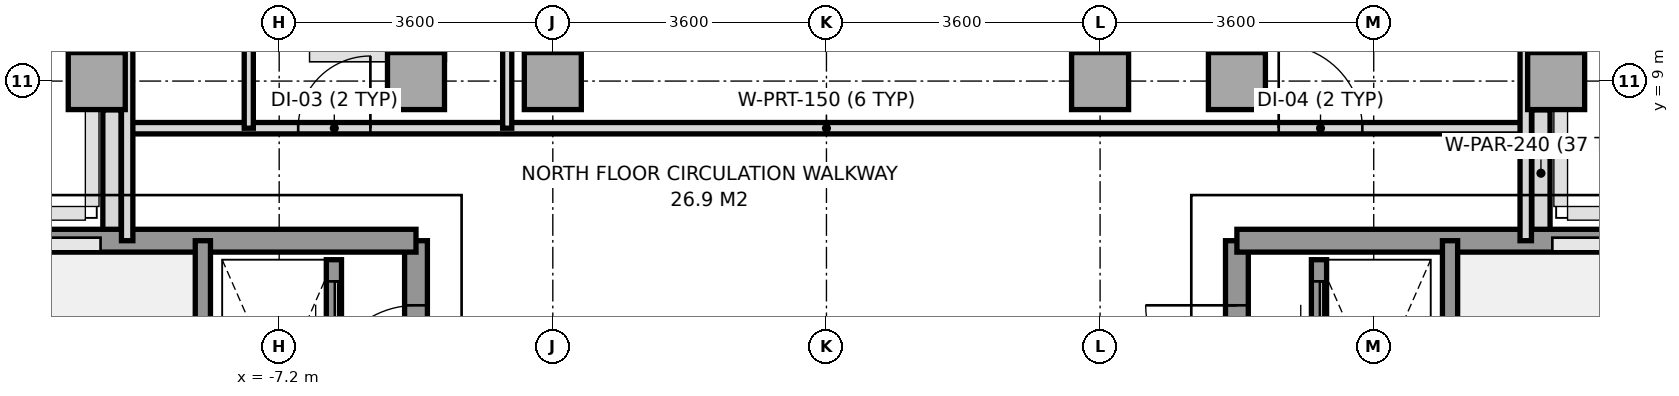
"""IFC4 building model, lengths in metres.
Left out: names, types, materials, properties, quantities, classifications, styles, units other than length and angle.
Written with IfcOpenShell. Run it as: python <this file> out.ifc"""

import sys

from ifc_helpers import new_model, si_unit, direction, frame, frame_2d, origin, origin_2d, place, context, subcontext, project, spatial, rectangle, extrude, source, transform, mapped, element, fill, save


model = new_model("IFC4")
c1 = context("Model", 3, precision=1e-05, world=origin(), true_north=direction((0.0, 1.0)))
c2 = subcontext(c1, "Body", "Model", "MODEL_VIEW")
j1 = project(units=[si_unit("LENGTHUNIT", "METRE"), si_unit("PLANEANGLEUNIT", "RADIAN")], contexts=[c1])
p1 = place(None, origin())
s1 = spatial("IfcSite", under=j1, at=p1, CompositionType="ELEMENT")
p2 = place(p1, origin())
s2 = spatial("IfcBuilding", under=s1, at=p2, CompositionType="ELEMENT")
p3 = place(p2, frame((0.0, 0.0, 219.4)))
s3 = spatial("IfcBuildingStorey", under=s2, at=p3, CompositionType="ELEMENT", Elevation=219.4)
m1 = source(origin(), c2, "Body", "SweptSolid", [
    extrude(rectangle(XDim=0.75, YDim=0.75, at=origin_2d()), origin(), (0.0, 0.0, 1.0), 4.01),
])
for number, where, z_axis, x_axis in (
    (1, (-9.6, 9.0, 0.0), (0.0, 0.0, 1.0), (1.0, 0.0, 0.0)),
    (2, (-5.4, 9.0, 0.0), (0.0, 0.0, 1.0), (1.0, 0.0, 0.0)),
    (3, (-3.6, 9.0, 0.0), (0.0, 0.0, 1.0), (1.0, 0.0, 0.0)),
    (4, (3.6, 9.0, 0.0), (0.0, 0.0, 1.0), (1.0, 0.0, 0.0)),
    (5, (5.4, 9.0, 0.0), (0.0, 0.0, 1.0), (1.0, 0.0, 0.0)),
    (6, (9.6, 9.0, 0.0), (0.0, 0.0, 1.0), (1.0, 0.0, 0.0)),
):
    element("IfcColumn", number, at=place(p3, frame(where, z_axis=z_axis, x_axis=x_axis)), inside=s3, PredefinedType="COLUMN", context=c2, shape_type="MappedRepresentation", body=[
        mapped(m1, transform((0.0, 0.0, 0.0), x_axis=(1.0, 0.0, 0.0), y_axis=(0.0, 1.0, 0.0), z_axis=(0.0, 0.0, 1.0), scale=1.0)),
    ])
p4 = place(p3, frame((-9.4, 6.953, 0.0), z_axis=(0.0, 0.0, 1.0), x_axis=(0.0, 1.0, 0.0)))
e7 = element("IfcWall", 7, at=p4, inside=s3, PredefinedType="PARAPET", context=c2, shape_type="SweptSolid", body=[
    extrude(rectangle(XDim=1.669, YDim=0.24, at=frame_2d((0.834, 0.0))), origin(), (0.0, 0.0, 1.0), 1.15),
])
p5 = place(p3, frame((-9.4, 9.378, 0.0), z_axis=(0.0, 0.0, 1.0), x_axis=(0.0, 1.0, 0.0)))
e8 = element("IfcWall", 8, at=p5, inside=s3, PredefinedType="PARAPET", context=c2, shape_type="SweptSolid", body=[
    extrude(rectangle(XDim=0.825, YDim=0.24, at=frame_2d((0.413, 0.0))), origin(), (0.0, 0.0, 1.0), 1.15),
])
p6 = place(p3, frame((9.4, 9.958, 0.0), z_axis=(0.0, 0.0, 1.0), x_axis=(0.0, -1.0, 0.0)))
e9 = element("IfcWall", 9, at=p6, inside=s3, PredefinedType="PARAPET", context=c2, shape_type="SweptSolid", body=[
    extrude(rectangle(XDim=0.58, YDim=0.24, at=frame_2d((0.29, 0.0))), origin(), (0.0, 0.0, 1.0), 1.15),
])
p7 = place(p3, frame((9.4, 8.622, 0.0), z_axis=(0.0, 0.0, 1.0), x_axis=(0.0, -1.0, 0.0)))
e10 = element("IfcWall", 10, at=p7, inside=s3, PredefinedType="PARAPET", context=c2, shape_type="SweptSolid", body=[
    extrude(rectangle(XDim=1.669, YDim=0.24, at=frame_2d((0.834, 0.0))), origin(), (0.0, 0.0, 1.0), 1.15),
])
p8 = place(p3, frame((-5.4, -5.6, 0.0), z_axis=(0.0, 0.0, 1.0), x_axis=(0.0, 1.0, 0.0)))
e11 = element("IfcWall", 11, at=p8, inside=s3, PredefinedType="SHEAR", context=c2, shape_type="SweptSolid", body=[
    extrude(rectangle(XDim=12.5, YDim=0.3, at=frame_2d((6.25, 0.0))), origin(), (0.0, 0.0, 1.0), 4.01),
])
p9 = place(p8, frame((4.55, 0.0, 0.0)))
e12 = element("IfcOpeningElement", 12, at=p9, cuts=e11, PredefinedType="OPENING", context=c2, shape_type="SweptSolid", body=[
    extrude(rectangle(XDim=1.2, YDim=2.2, at=frame_2d((0.6, 1.1))), frame((0.0, 0.16, 0.0), z_axis=(0.0, -1.0, 0.0), x_axis=(1.0, 0.0, 0.0)), (0.0, 0.0, 1.0), 0.32),
])
p10 = place(p8, frame((10.45, 0.0, 0.0)))
e13 = element("IfcOpeningElement", 13, at=p10, cuts=e11, PredefinedType="OPENING", context=c2, shape_type="SweptSolid", body=[
    extrude(rectangle(XDim=1.2, YDim=2.2, at=frame_2d((0.6, 1.1))), frame((0.0, 0.16, 0.0), z_axis=(0.0, -1.0, 0.0), x_axis=(1.0, 0.0, 0.0)), (0.0, 0.0, 1.0), 0.32),
])
p11 = place(p8, frame((6.86, 0.0, 0.0)))
e14 = element("IfcOpeningElement", 14, at=p11, cuts=e11, PredefinedType="OPENING", context=c2, shape_type="SweptSolid", body=[
    extrude(rectangle(XDim=0.8, YDim=2.1, at=frame_2d((0.4, 1.05))), frame((0.0, 0.16, 0.0), z_axis=(0.0, -1.0, 0.0), x_axis=(1.0, 0.0, 0.0)), (0.0, 0.0, 1.0), 0.32),
])
p12 = place(p8, frame((7.88, 0.0, 0.0)))
e15 = element("IfcOpeningElement", 15, at=p12, cuts=e11, PredefinedType="OPENING", context=c2, shape_type="SweptSolid", body=[
    extrude(rectangle(XDim=0.8, YDim=2.1, at=frame_2d((0.4, 1.05))), frame((0.0, 0.16, 0.0), z_axis=(0.0, -1.0, 0.0), x_axis=(1.0, 0.0, 0.0)), (0.0, 0.0, 1.0), 0.32),
])
p13 = place(p3, frame((-11.356, 6.9, 0.0), z_axis=(0.0, 0.0, 1.0), x_axis=(1.0, 0.0, 0.0)))
e16 = element("IfcWall", 16, at=p13, inside=s3, PredefinedType="SHEAR", context=c2, shape_type="SweptSolid", body=[
    extrude(rectangle(XDim=5.956, YDim=0.3, at=frame_2d((2.978, 0.0))), origin(), (0.0, 0.0, 1.0), 4.01),
])
p14 = place(p3, frame((-8.204, -0.016, 0.0), z_axis=(0.0, 0.0, 1.0), x_axis=(0.0, 1.0, 0.0)))
e17 = element("IfcWall", 17, at=p14, inside=s3, PredefinedType="SOLIDWALL", context=c2, shape_type="SweptSolid", body=[
    extrude(rectangle(XDim=6.916, YDim=0.2, at=frame_2d((3.458, 0.0))), origin(), (0.0, 0.0, 1.0), 4.01),
])
p15 = place(p14, frame((0.2, 0.0, 0.0)))
e18 = element("IfcOpeningElement", 18, at=p15, cuts=e17, PredefinedType="OPENING", context=c2, shape_type="SweptSolid", body=[
    extrude(rectangle(XDim=1.2, YDim=2.2, at=frame_2d((0.6, 1.1))), frame((0.0, 0.11, 0.0), z_axis=(0.0, -1.0, 0.0), x_axis=(1.0, 0.0, 0.0)), (0.0, 0.0, 1.0), 0.22),
])
p16 = place(p3, frame((5.4, -5.6, 0.0), z_axis=(0.0, 0.0, 1.0), x_axis=(0.0, 1.0, 0.0)))
e19 = element("IfcWall", 19, at=p16, inside=s3, PredefinedType="SHEAR", context=c2, shape_type="SweptSolid", body=[
    extrude(rectangle(XDim=12.5, YDim=0.3, at=frame_2d((6.25, 0.0))), origin(), (0.0, 0.0, 1.0), 4.01),
])
p17 = place(p16, frame((4.55, 0.0, 0.0)))
e20 = element("IfcOpeningElement", 20, at=p17, cuts=e19, PredefinedType="OPENING", context=c2, shape_type="SweptSolid", body=[
    extrude(rectangle(XDim=1.2, YDim=2.2, at=frame_2d((0.6, 1.1))), frame((0.0, 0.16, 0.0), z_axis=(0.0, -1.0, 0.0), x_axis=(1.0, 0.0, 0.0)), (0.0, 0.0, 1.0), 0.32),
])
p18 = place(p16, frame((10.45, 0.0, 0.0)))
e21 = element("IfcOpeningElement", 21, at=p18, cuts=e19, PredefinedType="OPENING", context=c2, shape_type="SweptSolid", body=[
    extrude(rectangle(XDim=1.2, YDim=2.2, at=frame_2d((0.6, 1.1))), frame((0.0, 0.16, 0.0), z_axis=(0.0, -1.0, 0.0), x_axis=(1.0, 0.0, 0.0)), (0.0, 0.0, 1.0), 0.32),
])
p19 = place(p3, frame((5.4, 6.9, 0.0), z_axis=(0.0, 0.0, 1.0), x_axis=(1.0, 0.0, 0.0)))
e22 = element("IfcWall", 22, at=p19, inside=s3, PredefinedType="SHEAR", context=c2, shape_type="SweptSolid", body=[
    extrude(rectangle(XDim=5.956, YDim=0.3, at=frame_2d((2.978, 0.0))), origin(), (0.0, 0.0, 1.0), 4.01),
])
p20 = place(p3, frame((8.204, -0.016, 0.0), z_axis=(0.0, 0.0, 1.0), x_axis=(0.0, 1.0, 0.0)))
e23 = element("IfcWall", 23, at=p20, inside=s3, PredefinedType="SOLIDWALL", context=c2, shape_type="SweptSolid", body=[
    extrude(rectangle(XDim=6.916, YDim=0.2, at=frame_2d((3.458, 0.0))), origin(), (0.0, 0.0, 1.0), 4.01),
])
p21 = place(p20, frame((0.2, 0.0, 0.0)))
e24 = element("IfcOpeningElement", 24, at=p21, cuts=e23, PredefinedType="OPENING", context=c2, shape_type="SweptSolid", body=[
    extrude(rectangle(XDim=1.2, YDim=2.2, at=frame_2d((0.6, 1.1))), frame((0.0, 0.11, 0.0), z_axis=(0.0, -1.0, 0.0), x_axis=(1.0, 0.0, 0.0)), (0.0, 0.0, 1.0), 0.22),
])
p22 = place(p3, frame((-6.48, 4.98, 0.0), z_axis=(0.0, 0.0, 1.0), x_axis=(0.0, 1.0, 0.0)))
e25 = element("IfcWall", 25, at=p22, inside=s3, PredefinedType="SOLIDWALL", context=c2, shape_type="SweptSolid", body=[
    extrude(rectangle(XDim=1.67, YDim=0.2, at=frame_2d((0.835, 0.0))), origin(), (0.0, 0.0, 1.0), 4.01),
])
p23 = place(p22, frame((0.285, 0.0, 0.0)))
e26 = element("IfcOpeningElement", 26, at=p23, cuts=e25, PredefinedType="OPENING", context=c2, shape_type="SweptSolid", body=[
    extrude(rectangle(XDim=1.1, YDim=2.2, at=frame_2d((0.55, 1.1))), frame((0.0, 0.11, 0.0), z_axis=(0.0, -1.0, 0.0), x_axis=(1.0, 0.0, 0.0)), (0.0, 0.0, 1.0), 0.22),
])
p24 = place(p3, frame((6.48, 4.98, 0.0), z_axis=(0.0, 0.0, 1.0), x_axis=(0.0, 1.0, 0.0)))
e27 = element("IfcWall", 27, at=p24, inside=s3, PredefinedType="SOLIDWALL", context=c2, shape_type="SweptSolid", body=[
    extrude(rectangle(XDim=1.67, YDim=0.2, at=frame_2d((0.835, 0.0))), origin(), (0.0, 0.0, 1.0), 4.01),
])
p25 = place(p24, frame((0.285, 0.0, 0.0)))
e28 = element("IfcOpeningElement", 28, at=p25, cuts=e27, PredefinedType="OPENING", context=c2, shape_type="SweptSolid", body=[
    extrude(rectangle(XDim=1.1, YDim=2.2, at=frame_2d((0.55, 1.1))), frame((0.0, 0.11, 0.0), z_axis=(0.0, -1.0, 0.0), x_axis=(1.0, 0.0, 0.0)), (0.0, 0.0, 1.0), 0.22),
])
p26 = place(p3, frame((-9.2, 8.38, 0.0), z_axis=(0.0, 0.0, 1.0), x_axis=(1.0, 0.0, 0.0)))
e29 = element("IfcWall", 29, at=p26, inside=s3, PredefinedType="PARTITIONING", context=c2, shape_type="SweptSolid", body=[
    extrude(rectangle(XDim=18.4, YDim=0.15, at=frame_2d((9.2, 0.0))), origin(), (0.0, 0.0, 1.0), 3.57),
])
p27 = place(p26, frame((2.25, 0.0, 0.0)))
e30 = element("IfcOpeningElement", 30, at=p27, cuts=e29, PredefinedType="OPENING", context=c2, shape_type="SweptSolid", body=[
    extrude(rectangle(XDim=0.95, YDim=2.15, at=frame_2d((0.475, 1.075))), frame((0.0, 0.085, 0.0), z_axis=(0.0, -1.0, 0.0), x_axis=(1.0, 0.0, 0.0)), (0.0, 0.0, 1.0), 0.17),
])
p28 = place(p26, frame((15.15, 0.0, 0.0)))
e31 = element("IfcOpeningElement", 31, at=p28, cuts=e29, PredefinedType="OPENING", context=c2, shape_type="SweptSolid", body=[
    extrude(rectangle(XDim=1.1, YDim=2.2, at=frame_2d((0.55, 1.1))), frame((0.0, 0.085, 0.0), z_axis=(0.0, -1.0, 0.0), x_axis=(1.0, 0.0, 0.0)), (0.0, 0.0, 1.0), 0.17),
])
for number, where, z_axis, x_axis in (
    (32, (-9.2, 6.9, 0.0), (0.0, 0.0, 1.0), (0.0, 1.0, 0.0)),
    (33, (9.2, 6.9, 0.0), (0.0, 0.0, 1.0), (0.0, 1.0, 0.0)),
):
    element("IfcWall", number, at=place(p3, frame(where, z_axis=z_axis, x_axis=x_axis)), inside=s3, PredefinedType="PARTITIONING", context=c2, shape_type="SweptSolid", body=[
        extrude(rectangle(XDim=3.38, YDim=0.15, at=frame_2d((1.69, 0.0))), origin(), (0.0, 0.0, 1.0), 3.61),
    ])
for number, where, z_axis, x_axis in (
    (34, (-7.6, 8.38, 0.0), (0.0, 0.0, 1.0), (0.0, 1.0, 0.0)),
    (35, (-4.2, 8.38, 0.0), (0.0, 0.0, 1.0), (0.0, 1.0, 0.0)),
):
    element("IfcWall", number, at=place(p3, frame(where, z_axis=z_axis, x_axis=x_axis)), inside=s3, PredefinedType="PARTITIONING", context=c2, shape_type="SweptSolid", body=[
        extrude(rectangle(XDim=3.55, YDim=0.12, at=frame_2d((1.775, 0.0))), origin(), (0.0, 0.0, 1.0), 3.61),
    ])
m2 = source(origin(), c2, "Body", "SweptSolid", [
    extrude(rectangle(XDim=1.2, YDim=2.2, at=frame_2d((0.6, 1.1))), frame((0.0, 0.025, 0.0), z_axis=(0.0, -1.0, 0.0), x_axis=(1.0, 0.0, 0.0)), (0.0, 0.0, 1.0), 0.05),
])
p29 = place(p10, origin())
e36 = element("IfcDoor", 36, at=p29, inside=s3, OperationType="SINGLE_SWING_LEFT", PredefinedType="DOOR", context=c2, shape_type="MappedRepresentation", body=[
    mapped(m2, transform((0.0, 0.0, 0.0), x_axis=(1.0, 0.0, 0.0), y_axis=(0.0, 1.0, 0.0), z_axis=(0.0, 0.0, 1.0), scale=1.0)),
])
fill(e13, e36)
p30 = place(p18, origin())
e37 = element("IfcDoor", 37, at=p30, inside=s3, OperationType="SINGLE_SWING_RIGHT", PredefinedType="DOOR", context=c2, shape_type="MappedRepresentation", body=[
    mapped(m2, transform((0.0, 0.0, 0.0), x_axis=(1.0, 0.0, 0.0), y_axis=(0.0, 1.0, 0.0), z_axis=(0.0, 0.0, 1.0), scale=1.0)),
])
fill(e21, e37)
m3 = source(origin(), c2, "Body", "SweptSolid", [
    extrude(rectangle(XDim=1.1, YDim=2.2, at=frame_2d((0.55, 1.1))), frame((0.0, 0.025, 0.0), z_axis=(0.0, -1.0, 0.0), x_axis=(1.0, 0.0, 0.0)), (0.0, 0.0, 1.0), 0.05),
])
p31 = place(p23, origin())
e38 = element("IfcDoor", 38, at=p31, inside=s3, OperationType="SLIDING_TO_LEFT", PredefinedType="DOOR", context=c2, shape_type="MappedRepresentation", body=[
    mapped(m3, transform((0.0, 0.0, 0.0), x_axis=(1.0, 0.0, 0.0), y_axis=(0.0, 1.0, 0.0), z_axis=(0.0, 0.0, 1.0), scale=1.0)),
])
fill(e26, e38)
p32 = place(p25, origin())
e39 = element("IfcDoor", 39, at=p32, inside=s3, OperationType="SLIDING_TO_LEFT", PredefinedType="DOOR", context=c2, shape_type="MappedRepresentation", body=[
    mapped(m3, transform((0.0, 0.0, 0.0), x_axis=(1.0, 0.0, 0.0), y_axis=(0.0, 1.0, 0.0), z_axis=(0.0, 0.0, 1.0), scale=1.0)),
])
fill(e28, e39)
m4 = source(origin(), c2, "Body", "SweptSolid", [
    extrude(rectangle(XDim=0.95, YDim=2.15, at=frame_2d((0.475, 1.075))), frame((0.0, 0.025, 0.0), z_axis=(0.0, -1.0, 0.0), x_axis=(1.0, 0.0, 0.0)), (0.0, 0.0, 1.0), 0.05),
])
p33 = place(p27, origin())
e40 = element("IfcDoor", 40, at=p33, inside=s3, OperationType="SINGLE_SWING_RIGHT", PredefinedType="DOOR", context=c2, shape_type="MappedRepresentation", body=[
    mapped(m4, transform((0.0, 0.0, 0.0), x_axis=(1.0, 0.0, 0.0), y_axis=(0.0, 1.0, 0.0), z_axis=(0.0, 0.0, 1.0), scale=1.0)),
])
fill(e30, e40)
p34 = place(p28, origin())
e41 = element("IfcDoor", 41, at=p34, inside=s3, OperationType="SINGLE_SWING_LEFT", PredefinedType="DOOR", context=c2, shape_type="MappedRepresentation", body=[
    mapped(m3, transform((0.0, 0.0, 0.0), x_axis=(1.0, 0.0, 0.0), y_axis=(0.0, 1.0, 0.0), z_axis=(0.0, 0.0, 1.0), scale=1.0)),
])
fill(e31, e41)
save(model, sys.argv[1])
